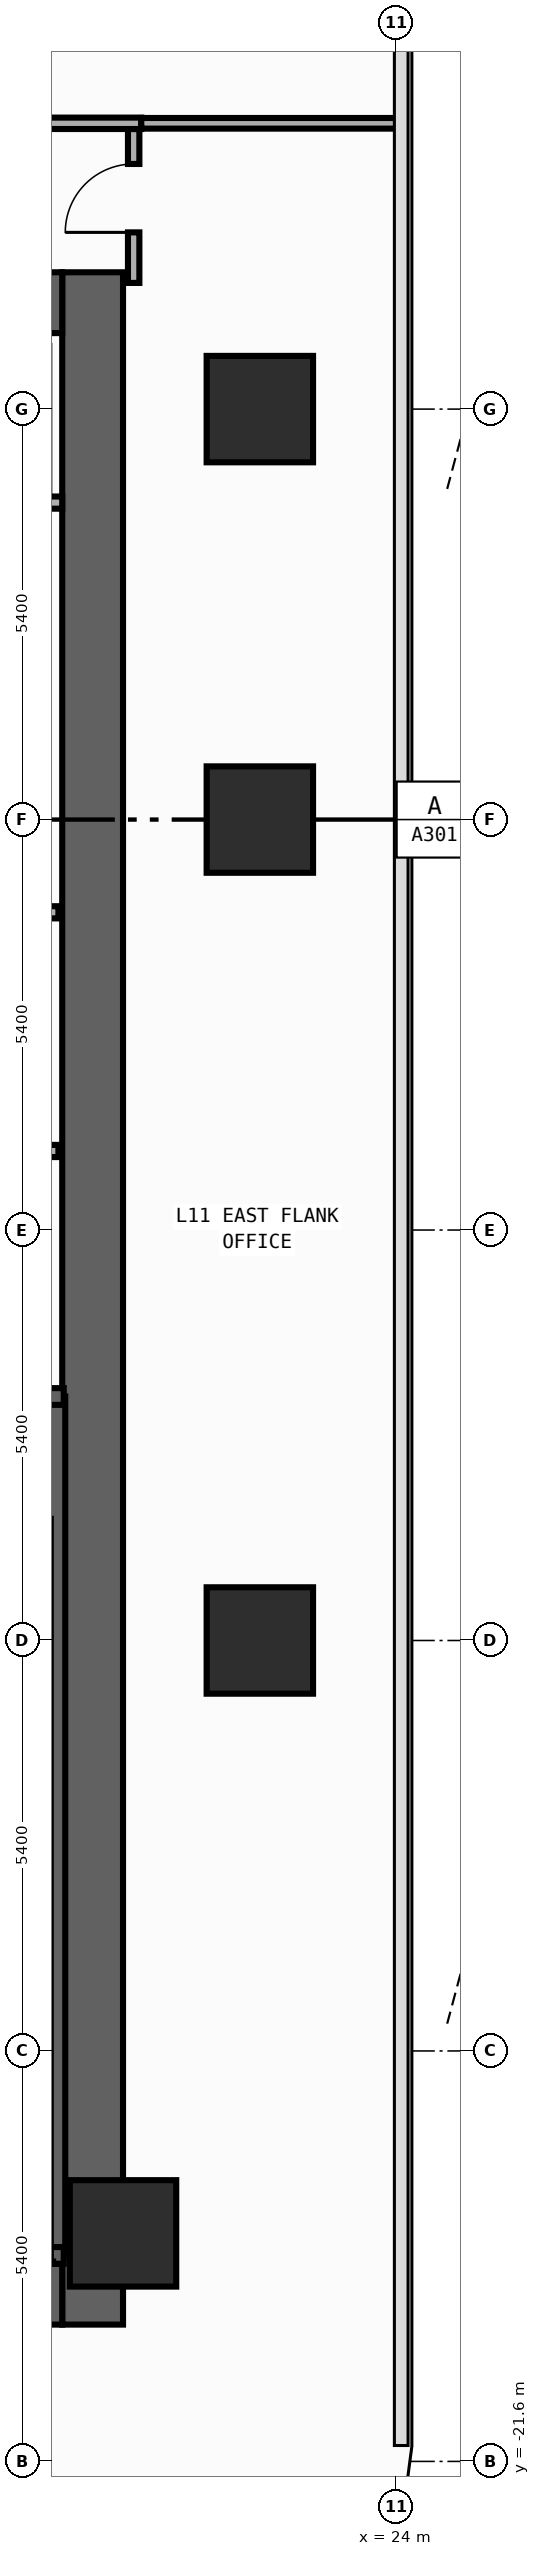
"""IFC4 building model, lengths in metres.
Left out: names, types, materials, properties, quantities, classifications, styles, units other than length and angle.
Written with IfcOpenShell. Run it as: python <this file> out.ifc"""

import sys

from ifc_helpers import new_model, si_unit, direction, frame, frame_2d, origin, origin_2d, place, context, subcontext, project, spatial, rectangle, extrude, element, fill, save


model = new_model("IFC4")
c1 = context("Model", 3, precision=1e-05, world=origin(), true_north=direction((0.0, 1.0)))
c2 = subcontext(c1, "Body", "Model", "MODEL_VIEW")
j1 = project(units=[si_unit("LENGTHUNIT", "METRE"), si_unit("PLANEANGLEUNIT", "RADIAN")], contexts=[c1])
p1 = place(None, origin())
s1 = spatial("IfcSite", under=j1, at=p1, CompositionType="ELEMENT")
p2 = place(p1, origin())
s2 = spatial("IfcBuilding", under=s1, at=p2, CompositionType="ELEMENT")
p3 = place(p2, frame((0.0, 0.0, 47.0)))
s3 = spatial("IfcBuildingStorey", under=s2, at=p3, CompositionType="ELEMENT", Elevation=47.0)
p4 = place(p3, frame((20.0, -19.8, 0.0), z_axis=(0.0, 0.0, 1.0), x_axis=(0.0, 1.0, 0.0)))
e1 = element("IfcWall", 1, at=p4, inside=s3, PredefinedType="SHEAR", context=c2, shape_type="SweptSolid", body=[
    extrude(rectangle(XDim=27.0, YDim=0.8, at=frame_2d((13.5, 0.0))), origin(), (0.0, 0.0, 1.0), 3.94),
])
for number, where, z_axis, x_axis in (
    (2, (12.8, -19.4, 0.0), (0.0, 0.0, 1.0), (1.0, 0.0, 0.0)),
    (3, (12.8, 6.8, 0.0), (0.0, 0.0, 1.0), (1.0, 0.0, 0.0)),
):
    element("IfcWall", number, at=place(p3, frame(where, z_axis=z_axis, x_axis=x_axis)), inside=s3, PredefinedType="SHEAR", context=c2, shape_type="SweptSolid", body=[
        extrude(rectangle(XDim=6.8, YDim=0.8, at=frame_2d((3.4, 0.0))), origin(), (0.0, 0.0, 1.0), 3.94),
    ])
p5 = place(p3, frame((19.53, -18.89, 0.0), z_axis=(0.0, 0.0, 1.0), x_axis=(0.0, 1.0, 0.0)))
e4 = element("IfcWall", 4, at=p5, inside=s3, PredefinedType="SHEAR", context=c2, shape_type="SweptSolid", body=[
    extrude(rectangle(XDim=11.3, YDim=0.22, at=frame_2d((5.65, 0.0))), origin(), (0.0, 0.0, 1.0), 3.94),
])
p6 = place(p3, frame((15.705, -18.89, 0.0), z_axis=(0.0, 0.0, 1.0), x_axis=(1.0, 0.0, 0.0)))
e5 = element("IfcWall", 5, at=p6, inside=s3, PredefinedType="SHEAR", context=c2, shape_type="SweptSolid", body=[
    extrude(rectangle(XDim=3.915, YDim=0.22, at=frame_2d((1.958, 0.0))), origin(), (0.0, 0.0, 1.0), 3.94),
])
p7 = place(p3, frame((19.62, -7.59, 0.0), z_axis=(0.0, 0.0, 1.0), x_axis=(-1.0, 0.0, 0.0)))
e6 = element("IfcWall", 6, at=p7, inside=s3, PredefinedType="SHEAR", context=c2, shape_type="SweptSolid", body=[
    extrude(rectangle(XDim=3.915, YDim=0.22, at=frame_2d((1.958, 0.0))), origin(), (0.0, 0.0, 1.0), 3.94),
])
p8 = place(p7, frame((1.08, 0.0, 0.0)))
e7 = element("IfcOpeningElement", 7, at=p8, cuts=e6, PredefinedType="OPENING", context=c2, shape_type="SweptSolid", body=[
    extrude(rectangle(XDim=1.1, YDim=2.2, at=frame_2d((0.55, 1.1))), frame((0.0, 0.12, 0.0), z_axis=(0.0, -1.0, 0.0), x_axis=(1.0, 0.0, 0.0)), (0.0, 0.0, 1.0), 0.24),
])
for number, where, z_axis, x_axis in (
    (8, (20.4, -18.6, 0.0), (0.0, 0.0, 1.0), (1.0, 0.0, 0.0)),
    (9, (22.2, -10.8, 0.0), (0.0, 0.0, 1.0), (1.0, 0.0, 0.0)),
    (10, (22.2, 0.0, 0.0), (0.0, 0.0, 1.0), (1.0, 0.0, 0.0)),
    (11, (22.2, 5.4, 0.0), (0.0, 0.0, 1.0), (1.0, 0.0, 0.0)),
):
    element("IfcColumn", number, at=place(p3, frame(where, z_axis=z_axis, x_axis=x_axis)), inside=s3, PredefinedType="COLUMN", context=c2, shape_type="SweptSolid", body=[
        extrude(rectangle(XDim=1.4, YDim=1.4, at=origin_2d()), origin(), (0.0, 0.0, 1.0), 4.2),
    ])
p9 = place(p3, frame((15.75, -4.36, 0.0), z_axis=(0.0, 0.0, 1.0), x_axis=(1.0, 0.0, 0.0)))
e12 = element("IfcWall", 12, at=p9, inside=s3, PredefinedType="STANDARD", context=c2, shape_type="SweptSolid", body=[
    extrude(rectangle(XDim=3.8, YDim=0.16, at=frame_2d((1.9, 0.0))), origin(), (0.0, 0.0, 1.0), 3.94),
])
p10 = place(p9, frame((1.47, 0.0, 0.0)))
e13 = element("IfcOpeningElement", 13, at=p10, cuts=e12, PredefinedType="OPENING", context=c2, shape_type="SweptSolid", body=[
    extrude(rectangle(XDim=1.15, YDim=2.2, at=frame_2d((0.575, 1.1))), frame((0.0, 0.09, 0.0), z_axis=(0.0, -1.0, 0.0), x_axis=(1.0, 0.0, 0.0)), (0.0, 0.0, 1.0), 0.18),
])
p11 = place(p3, frame((15.75, -1.22, 0.0), z_axis=(0.0, 0.0, 1.0), x_axis=(1.0, 0.0, 0.0)))
e14 = element("IfcWall", 14, at=p11, inside=s3, PredefinedType="STANDARD", context=c2, shape_type="SweptSolid", body=[
    extrude(rectangle(XDim=3.8, YDim=0.16, at=frame_2d((1.9, 0.0))), origin(), (0.0, 0.0, 1.0), 3.94),
])
p12 = place(p3, frame((17.31, 4.17, 0.0), z_axis=(0.0, 0.0, 1.0), x_axis=(1.0, 0.0, 0.0)))
e15 = element("IfcWall", 15, at=p12, inside=s3, PredefinedType="PARTITIONING", context=c2, shape_type="SweptSolid", body=[
    extrude(rectangle(XDim=2.29, YDim=0.16, at=frame_2d((1.145, 0.0))), origin(), (0.0, 0.0, 1.0), 3.94),
])
p13 = place(p3, frame((20.54, 7.06, 0.0), z_axis=(0.0, 0.0, 1.0), x_axis=(0.0, 1.0, 0.0)))
e16 = element("IfcWall", 16, at=p13, inside=s3, PredefinedType="PARTITIONING", context=c2, shape_type="SweptSolid", body=[
    extrude(rectangle(XDim=2.025, YDim=0.15, at=frame_2d((1.012, 0.0))), origin(), (0.0, 0.0, 1.0), 3.94),
])
p14 = place(p13, frame((0.665, 0.0, 0.0)))
e17 = element("IfcOpeningElement", 17, at=p14, cuts=e16, PredefinedType="OPENING", context=c2, shape_type="SweptSolid", body=[
    extrude(rectangle(XDim=0.9, YDim=2.15, at=frame_2d((0.45, 1.075))), frame((0.0, 0.085, 0.0), z_axis=(0.0, -1.0, 0.0), x_axis=(1.0, 0.0, 0.0)), (0.0, 0.0, 1.0), 0.17),
])
p15 = place(p3, frame((11.81, 9.16, 0.0), z_axis=(0.0, 0.0, 1.0), x_axis=(1.0, 0.0, 0.0)))
e18 = element("IfcWall", 18, at=p15, inside=s3, PredefinedType="PARTITIONING", context=c2, shape_type="SweptSolid", body=[
    extrude(rectangle(XDim=8.83, YDim=0.15, at=frame_2d((4.415, 0.0))), origin(), (0.0, 0.0, 1.0), 3.94),
])
p16 = place(p15, frame((5.067, 0.0, 0.0)))
e19 = element("IfcOpeningElement", 19, at=p16, cuts=e18, PredefinedType="OPENING", context=c2, shape_type="SweptSolid", body=[
    extrude(rectangle(XDim=0.9, YDim=2.15, at=frame_2d((0.45, 1.075))), frame((0.0, 0.085, 0.0), z_axis=(0.0, -1.0, 0.0), x_axis=(1.0, 0.0, 0.0)), (0.0, 0.0, 1.0), 0.17),
])
p17 = place(p3, frame((20.64, 9.16, 0.0), z_axis=(0.0, 0.0, 1.0), x_axis=(1.0, 0.0, 0.0)))
e20 = element("IfcWall", 20, at=p17, inside=s3, PredefinedType="PARTITIONING", context=c2, shape_type="SweptSolid", body=[
    extrude(rectangle(XDim=3.415, YDim=0.14, at=frame_2d((1.708, 0.0))), origin(), (0.0, 0.0, 1.0), 3.94),
])
p18 = place(p14, origin())
e21 = element("IfcDoor", 21, at=p18, inside=s3, OperationType="SINGLE_SWING_LEFT", PredefinedType="DOOR", context=c2, shape_type="SweptSolid", body=[
    extrude(rectangle(XDim=0.9, YDim=2.15, at=frame_2d((0.45, 1.075))), frame((0.0, 0.025, 0.0), z_axis=(0.0, -1.0, 0.0), x_axis=(1.0, 0.0, 0.0)), (0.0, 0.0, 1.0), 0.05),
])
fill(e17, e21)
save(model, sys.argv[1])
